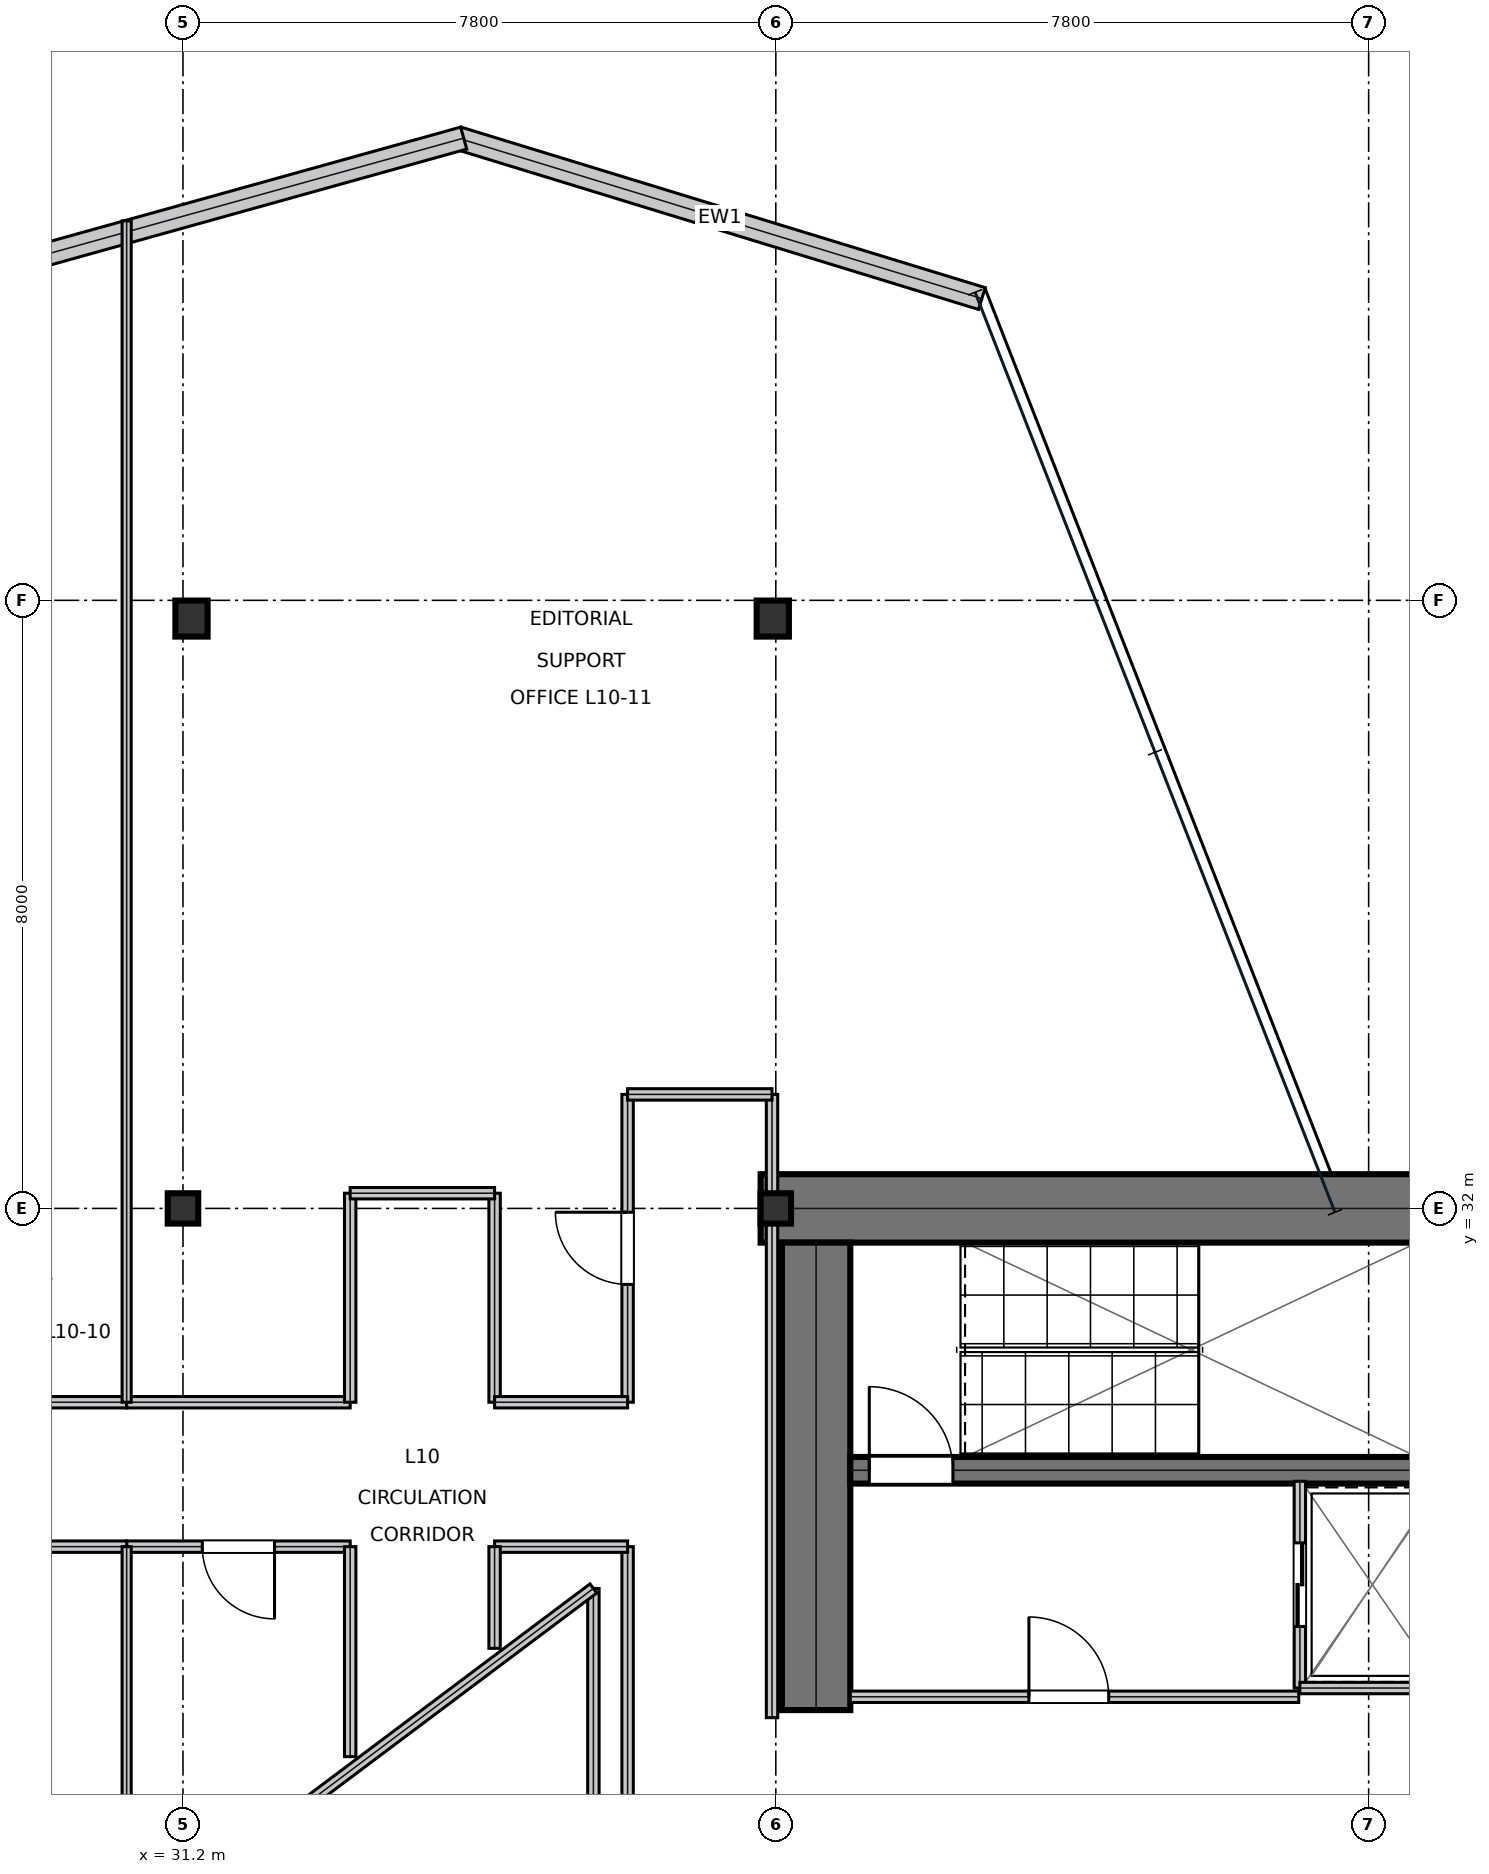
"""IFC4 building model, lengths in metres.
Left out: names, types, materials, properties, quantities, classifications, styles, units other than length and angle.
Written with IfcOpenShell. Run it as: python <this file> out.ifc"""

import sys

from ifc_helpers import new_model, si_unit, direction, frame, frame_2d, origin, origin_2d, place, context, subcontext, project, spatial, rectangle, i_section, extrude, element, fill, save


model = new_model("IFC4")
c1 = context("Model", 3, precision=1e-05, world=origin(), true_north=direction((0.0, 1.0)))
c2 = subcontext(c1, "Body", "Model", "MODEL_VIEW")
j1 = project(units=[si_unit("LENGTHUNIT", "METRE"), si_unit("PLANEANGLEUNIT", "RADIAN")], contexts=[c1])
p1 = place(None, origin())
s1 = spatial("IfcSite", under=j1, at=p1, CompositionType="ELEMENT")
p2 = place(p1, origin())
s2 = spatial("IfcBuilding", under=s1, at=p2, CompositionType="ELEMENT")
p3 = place(p2, frame((0.0, 0.0, 49.95)))
s3 = spatial("IfcBuildingStorey", under=s2, at=p3, CompositionType="ELEMENT", Elevation=49.95)
p4 = place(p3, frame((38.8, 32.0, 0.0), z_axis=(0.0, 0.0, 1.0), x_axis=(1.0, 0.0, 0.0)))
e1 = element("IfcWall", 1, at=p4, inside=s3, PredefinedType="SHEAR", context=c2, shape_type="SweptSolid", body=[
    extrude(rectangle(XDim=16.0, YDim=0.9, at=frame_2d((8.0, 0.0))), origin(), (0.0, 0.0, 1.0), 3.81),
])
p5 = place(p3, frame((39.53, 25.4, 0.0), z_axis=(0.0, 0.0, 1.0), x_axis=(0.0, 1.0, 0.0)))
e2 = element("IfcWall", 2, at=p5, inside=s3, PredefinedType="SHEAR", context=c2, shape_type="SweptSolid", body=[
    extrude(rectangle(XDim=6.15, YDim=0.9, at=frame_2d((3.075, 0.0))), origin(), (0.0, 0.0, 1.0), 3.81),
])
p6 = place(p3, frame((39.98, 28.555, 0.0), z_axis=(0.0, 0.0, 1.0), x_axis=(1.0, 0.0, 0.0)))
e3 = element("IfcWall", 3, at=p6, inside=s3, PredefinedType="SHEAR", context=c2, shape_type="SweptSolid", body=[
    extrude(rectangle(XDim=7.71, YDim=0.35, at=frame_2d((3.855, 0.0))), origin(), (0.0, 0.0, 1.0), 3.81),
])
p7 = place(p6, frame((0.25, 0.0, 0.0)))
e4 = element("IfcOpeningElement", 4, at=p7, cuts=e3, PredefinedType="OPENING", context=c2, shape_type="SweptSolid", body=[
    extrude(rectangle(XDim=1.1, YDim=2.15, at=frame_2d((0.55, 1.075))), frame((0.0, 0.185, 0.0), z_axis=(0.0, -1.0, 0.0), x_axis=(1.0, 0.0, 0.0)), (0.0, 0.0, 1.0), 0.37),
])
for number, where, z_axis, x_axis in (
    (5, (31.2, 32.0, 0.0), (0.0, 0.0, 1.0), (1.0, 0.0, 0.0)),
    (6, (39.0, 32.0, 0.0), (0.0, 0.0, 1.0), (1.0, 0.0, 0.0)),
):
    element("IfcColumn", number, at=place(p3, frame(where, z_axis=z_axis, x_axis=x_axis)), inside=s3, PredefinedType="COLUMN", context=c2, shape_type="SweptSolid", body=[
        extrude(i_section(OverallWidth=0.401, OverallDepth=0.399, WebThickness=0.025, FlangeThickness=0.04, at=origin_2d()), origin(), (0.0, 0.0, 1.0), 4.044),
    ])
for number, where, z_axis, x_axis in (
    (7, (31.312, 39.76, 0.016), (0.0, 0.0, 1.0), (1.0, 0.0, 0.0)),
    (8, (38.96, 39.76, 0.016), (0.0, 0.0, 1.0), (1.0, 0.0, 0.0)),
):
    element("IfcColumn", number, at=place(p3, frame(where, z_axis=z_axis, x_axis=x_axis)), inside=s3, PredefinedType="COLUMN", context=c2, shape_type="SweptSolid", body=[
        extrude(i_section(OverallWidth=0.424, OverallDepth=0.474, WebThickness=0.048, FlangeThickness=0.077, at=origin_2d()), origin(), (0.0, 0.0, 1.0), 4.018),
    ])
p8 = place(p3, frame((41.711, 43.97, 0.0), z_axis=(0.0, 0.0, 1.0), x_axis=(-0.956174816369, 0.292796380685, 0.0)))
e9 = element("IfcWall", 9, at=p8, inside=s3, PredefinedType="STANDARD", context=c2, shape_type="SweptSolid", body=[
    extrude(rectangle(XDim=7.213, YDim=0.3, at=frame_2d((3.606, 0.0))), origin(), (0.0, 0.0, 1.0), 3.81),
])
p9 = place(p3, frame((34.894, 46.081, 0.0), z_axis=(0.0, 0.0, 1.0), x_axis=(-0.963365312104, -0.268192608836, 0.0)))
e10 = element("IfcWall", 10, at=p9, inside=s3, PredefinedType="STANDARD", context=c2, shape_type="SweptSolid", body=[
    extrude(rectangle(XDim=7.159, YDim=0.3, at=frame_2d((3.579, 0.0))), origin(), (0.0, 0.0, 1.0), 3.81),
])
p10 = place(p3, frame((39.98, 25.575, 0.0), z_axis=(0.0, 0.0, 1.0), x_axis=(1.0, 0.0, 0.0)))
e11 = element("IfcWall", 11, at=p10, inside=s3, PredefinedType="PARTITIONING", context=c2, shape_type="SweptSolid", body=[
    extrude(rectangle(XDim=5.9, YDim=0.15, at=frame_2d((2.95, 0.0))), origin(), (0.0, 0.0, 1.0), 3.81),
])
p11 = place(p10, frame((2.35, 0.0, 0.0)))
e12 = element("IfcOpeningElement", 12, at=p11, cuts=e11, PredefinedType="OPENING", context=c2, shape_type="SweptSolid", body=[
    extrude(rectangle(XDim=1.05, YDim=2.15, at=frame_2d((0.525, 1.075))), frame((0.0, 0.085, 0.0), z_axis=(0.0, -1.0, 0.0), x_axis=(1.0, 0.0, 0.0)), (0.0, 0.0, 1.0), 0.17),
])
p12 = place(p3, frame((45.895, 25.69, 0.0), z_axis=(0.0, 0.0, 1.0), x_axis=(0.0, 1.0, 0.0)))
e13 = element("IfcWall", 13, at=p12, inside=s3, PredefinedType="PARTITIONING", context=c2, shape_type="SweptSolid", body=[
    extrude(rectangle(XDim=2.72, YDim=0.15, at=frame_2d((1.36, 0.0))), origin(), (0.0, 0.0, 1.0), 3.81),
])
p13 = place(p12, frame((0.81, 0.0, 0.0)))
e14 = element("IfcOpeningElement", 14, at=p13, cuts=e13, PredefinedType="OPENING", context=c2, shape_type="SweptSolid", body=[
    extrude(rectangle(XDim=1.1, YDim=2.15, at=frame_2d((0.55, 1.075))), frame((0.0, 0.085, 0.0), z_axis=(0.0, -1.0, 0.0), x_axis=(1.0, 0.0, 0.0)), (0.0, 0.0, 1.0), 0.17),
])
p14 = place(p3, frame((45.895, 25.69, 0.0), z_axis=(0.0, 0.0, 1.0), x_axis=(1.0, 0.0, 0.0)))
e15 = element("IfcWall", 15, at=p14, inside=s3, PredefinedType="PARTITIONING", context=c2, shape_type="SweptSolid", body=[
    extrude(rectangle(XDim=1.915, YDim=0.15, at=frame_2d((0.958, 0.0))), origin(), (0.0, 0.0, 1.0), 3.81),
])
p15 = place(p3, frame((37.05, 14.5, 0.0), z_axis=(0.0, 0.0, 1.0), x_axis=(0.0, 1.0, 0.0)))
e16 = element("IfcWall", 16, at=p15, inside=s3, PredefinedType="PARTITIONING", context=c2, shape_type="SweptSolid", body=[
    extrude(rectangle(XDim=13.05, YDim=0.15, at=frame_2d((6.525, 0.0))), origin(), (0.0, 0.0, 1.0), 3.181),
])
p16 = place(p15, frame((4.61, 0.0, 0.0)))
e17 = element("IfcOpeningElement", 17, at=p16, cuts=e16, PredefinedType="OPENING", context=c2, shape_type="SweptSolid", body=[
    extrude(rectangle(XDim=0.95, YDim=2.15, at=frame_2d((0.475, 1.075))), frame((0.0, 0.085, 0.0), z_axis=(0.0, -1.0, 0.0), x_axis=(1.0, 0.0, 0.0)), (0.0, 0.0, 1.0), 0.17),
])
p17 = place(p3, frame((30.459, 27.55, 0.0), z_axis=(0.0, 0.0, 1.0), x_axis=(1.0, 0.0, 0.0)))
e18 = element("IfcWall", 18, at=p17, inside=s3, PredefinedType="PARTITIONING", context=c2, shape_type="SweptSolid", body=[
    extrude(rectangle(XDim=2.941, YDim=0.15, at=frame_2d((1.47, 0.0))), origin(), (0.0, 0.0, 1.0), 3.181),
])
p18 = place(p17, frame((0.996, 0.0, 0.0)))
e19 = element("IfcOpeningElement", 19, at=p18, cuts=e18, PredefinedType="OPENING", context=c2, shape_type="SweptSolid", body=[
    extrude(rectangle(XDim=0.95, YDim=2.15, at=frame_2d((0.475, 1.075))), frame((0.0, 0.085, 0.0), z_axis=(0.0, -1.0, 0.0), x_axis=(1.0, 0.0, 0.0)), (0.0, 0.0, 1.0), 0.17),
])
p19 = place(p3, frame((21.4, 27.55, 0.0), z_axis=(0.0, 0.0, 1.0), x_axis=(1.0, 0.0, 0.0)))
e20 = element("IfcWall", 20, at=p19, inside=s3, PredefinedType="PARTITIONING", context=c2, shape_type="SweptSolid", body=[
    extrude(rectangle(XDim=9.059, YDim=0.15, at=frame_2d((4.53, 0.0))), origin(), (0.0, 0.0, 1.0), 3.391),
])
p20 = place(p19, frame((4.054, 0.0, 0.0)))
e21 = element("IfcOpeningElement", 21, at=p20, cuts=e20, PredefinedType="OPENING", context=c2, shape_type="SweptSolid", body=[
    extrude(rectangle(XDim=0.95, YDim=2.15, at=frame_2d((0.475, 1.075))), frame((0.0, 0.085, 0.0), z_axis=(0.0, -1.0, 0.0), x_axis=(1.0, 0.0, 0.0)), (0.0, 0.0, 1.0), 0.17),
])
p21 = place(p3, frame((15.794, 29.45, 0.0), z_axis=(0.0, 0.0, 1.0), x_axis=(1.0, 0.0, 0.0)))
e22 = element("IfcWall", 22, at=p21, inside=s3, PredefinedType="PARTITIONING", context=c2, shape_type="SweptSolid", body=[
    extrude(rectangle(XDim=14.665, YDim=0.15, at=frame_2d((7.333, 0.0))), origin(), (0.0, 0.0, 1.0), 3.338),
])
p22 = place(p21, frame((10.458, 0.0, 0.0)))
e23 = element("IfcOpeningElement", 23, at=p22, cuts=e22, PredefinedType="OPENING", context=c2, shape_type="SweptSolid", body=[
    extrude(rectangle(XDim=0.95, YDim=2.15, at=frame_2d((0.475, 1.075))), frame((0.0, 0.085, 0.0), z_axis=(0.0, -1.0, 0.0), x_axis=(1.0, 0.0, 0.0)), (0.0, 0.0, 1.0), 0.17),
])
p23 = place(p3, frame((37.05, 29.45, 0.0), z_axis=(0.0, 0.0, 1.0), x_axis=(0.0, 1.0, 0.0)))
e24 = element("IfcWall", 24, at=p23, inside=s3, PredefinedType="PARTITIONING", context=c2, shape_type="SweptSolid", body=[
    extrude(rectangle(XDim=4.05, YDim=0.15, at=frame_2d((2.025, 0.0))), origin(), (0.0, 0.0, 1.0), 3.181),
])
p24 = place(p23, frame((1.55, 0.0, 0.0)))
e25 = element("IfcOpeningElement", 25, at=p24, cuts=e24, PredefinedType="OPENING", context=c2, shape_type="SweptSolid", body=[
    extrude(rectangle(XDim=0.95, YDim=2.15, at=frame_2d((0.475, 1.075))), frame((0.0, 0.085, 0.0), z_axis=(0.0, -1.0, 0.0), x_axis=(1.0, 0.0, 0.0)), (0.0, 0.0, 1.0), 0.17),
])
p25 = place(p3, frame((35.3, 27.55, 0.0), z_axis=(0.0, 0.0, 1.0), x_axis=(1.0, 0.0, 0.0)))
e26 = element("IfcWall", 26, at=p25, inside=s3, PredefinedType="PARTITIONING", context=c2, shape_type="SweptSolid", body=[
    extrude(rectangle(XDim=1.75, YDim=0.15, at=frame_2d((0.875, 0.0))), origin(), (0.0, 0.0, 1.0), 3.391),
])
p26 = place(p3, frame((35.3, 26.212, 0.0), z_axis=(0.0, 0.0, 1.0), x_axis=(0.0, 1.0, 0.0)))
e27 = element("IfcWall", 27, at=p26, inside=s3, PredefinedType="PARTITIONING", context=c2, shape_type="SweptSolid", body=[
    extrude(rectangle(XDim=1.338, YDim=0.15, at=frame_2d((0.669, 0.0))), origin(), (0.0, 0.0, 1.0), 3.81),
])
p27 = place(p3, frame((33.4, 24.788, 0.0), z_axis=(0.0, 0.0, 1.0), x_axis=(0.0, 1.0, 0.0)))
e28 = element("IfcWall", 28, at=p27, inside=s3, PredefinedType="PARTITIONING", context=c2, shape_type="SweptSolid", body=[
    extrude(rectangle(XDim=2.762, YDim=0.15, at=frame_2d((1.381, 0.0))), origin(), (0.0, 0.0, 1.0), 3.81),
])
p28 = place(p3, frame((38.95, 25.3, 0.0), z_axis=(0.0, 0.0, 1.0), x_axis=(0.0, 1.0, 0.0)))
e29 = element("IfcWall", 29, at=p28, inside=s3, PredefinedType="PARTITIONING", context=c2, shape_type="SweptSolid", body=[
    extrude(rectangle(XDim=8.2, YDim=0.15, at=frame_2d((4.1, 0.0))), origin(), (0.0, 0.0, 1.0), 3.181),
])
p29 = place(p3, frame((30.459, 29.45, 0.0), z_axis=(0.0, 0.0, 1.0), x_axis=(1.0, 0.0, 0.0)))
e30 = element("IfcWall", 30, at=p29, inside=s3, PredefinedType="PARTITIONING", context=c2, shape_type="SweptSolid", body=[
    extrude(rectangle(XDim=2.941, YDim=0.15, at=frame_2d((1.47, 0.0))), origin(), (0.0, 0.0, 1.0), 3.181),
])
for number, where, z_axis, x_axis in (
    (31, (33.4, 29.45, 0.0), (0.0, 0.0, 1.0), (0.0, 1.0, 0.0)),
    (32, (35.3, 29.45, 0.0), (0.0, 0.0, 1.0), (0.0, 1.0, 0.0)),
):
    element("IfcWall", number, at=place(p3, frame(where, z_axis=z_axis, x_axis=x_axis)), inside=s3, PredefinedType="PARTITIONING", context=c2, shape_type="SweptSolid", body=[
        extrude(rectangle(XDim=2.75, YDim=0.15, at=frame_2d((1.375, 0.0))), origin(), (0.0, 0.0, 1.0), 3.181),
    ])
p30 = place(p3, frame((37.05, 33.5, 0.0), z_axis=(0.0, 0.0, 1.0), x_axis=(1.0, 0.0, 0.0)))
e33 = element("IfcWall", 33, at=p30, inside=s3, PredefinedType="PARTITIONING", context=c2, shape_type="SweptSolid", body=[
    extrude(rectangle(XDim=1.9, YDim=0.15, at=frame_2d((0.95, 0.0))), origin(), (0.0, 0.0, 1.0), 3.81),
])
p31 = place(p3, frame((33.4, 32.2, 0.0), z_axis=(0.0, 0.0, 1.0), x_axis=(1.0, 0.0, 0.0)))
e34 = element("IfcWall", 34, at=p31, inside=s3, PredefinedType="PARTITIONING", context=c2, shape_type="SweptSolid", body=[
    extrude(rectangle(XDim=1.9, YDim=0.15, at=frame_2d((0.95, 0.0))), origin(), (0.0, 0.0, 1.0), 3.181),
])
p32 = place(p3, frame((35.3, 29.45, 0.0), z_axis=(0.0, 0.0, 1.0), x_axis=(1.0, 0.0, 0.0)))
e35 = element("IfcWall", 35, at=p32, inside=s3, PredefinedType="PARTITIONING", context=c2, shape_type="SweptSolid", body=[
    extrude(rectangle(XDim=1.75, YDim=0.15, at=frame_2d((0.875, 0.0))), origin(), (0.0, 0.0, 1.0), 3.81),
])
p33 = place(p3, frame((30.459, 23.111, 0.0), z_axis=(0.0, 0.0, 1.0), x_axis=(0.0, 1.0, 0.0)))
e36 = element("IfcWall", 36, at=p33, inside=s3, PredefinedType="PARTITIONING", context=c2, shape_type="SweptSolid", body=[
    extrude(rectangle(XDim=4.439, YDim=0.12, at=frame_2d((2.219, 0.0))), origin(), (0.0, 0.0, 1.0), 3.181),
])
p34 = place(p3, frame((30.459, 29.45, 0.0), z_axis=(0.0, 0.0, 1.0), x_axis=(0.0, 1.0, 0.0)))
e37 = element("IfcWall", 37, at=p34, inside=s3, PredefinedType="PARTITIONING", context=c2, shape_type="SweptSolid", body=[
    extrude(rectangle(XDim=15.542, YDim=0.12, at=frame_2d((7.771, 0.0))), origin(), (0.0, 0.0, 1.0), 3.338),
])
p35 = place(p3, frame((36.6, 21.0, 0.0), z_axis=(0.0, 0.0, 1.0), x_axis=(0.0, 1.0, 0.0)))
e38 = element("IfcWall", 38, at=p35, inside=s3, PredefinedType="MOVABLE", context=c2, shape_type="SweptSolid", body=[
    extrude(rectangle(XDim=6.0, YDim=0.15, at=frame_2d((3.0, 0.0))), origin(), (0.0, 0.0, 1.0), 3.81),
])
p36 = place(p3, frame((36.6, 27.0, 0.0), z_axis=(0.0, 0.0, 1.0), x_axis=(-0.8, -0.6, 0.0)))
e39 = element("IfcWall", 39, at=p36, inside=s3, PredefinedType="MOVABLE", context=c2, shape_type="SweptSolid", body=[
    extrude(rectangle(XDim=5.0, YDim=0.15, at=frame_2d((2.5, 0.0))), origin(), (0.0, 0.0, 1.0), 3.81),
])
p37 = place(p11, origin())
e40 = element("IfcDoor", 40, at=p37, inside=s3, OperationType="SINGLE_SWING_LEFT", PredefinedType="DOOR", context=c2, shape_type="SweptSolid", body=[
    extrude(rectangle(XDim=1.05, YDim=2.15, at=frame_2d((0.525, 1.075))), frame((0.0, 0.025, 0.0), z_axis=(0.0, -1.0, 0.0), x_axis=(1.0, 0.0, 0.0)), (0.0, 0.0, 1.0), 0.05),
])
fill(e12, e40)
p38 = place(p13, frame((1.1, 0.0, 0.0), z_axis=(0.0, 0.0, 1.0), x_axis=(-1.0, 0.0, 0.0)))
e41 = element("IfcDoor", 41, at=p38, inside=s3, OperationType="DOUBLE_DOOR_SLIDING", PredefinedType="DOOR", context=c2, shape_type="SweptSolid", body=[
    extrude(rectangle(XDim=1.1, YDim=2.15, at=frame_2d((0.55, 1.075))), frame((0.0, 0.025, 0.0), z_axis=(0.0, -1.0, 0.0), x_axis=(1.0, 0.0, 0.0)), (0.0, 0.0, 1.0), 0.05),
])
fill(e14, e41)
p39 = place(p18, frame((0.95, 0.0, 0.0), z_axis=(0.0, 0.0, 1.0), x_axis=(-1.0, 0.0, 0.0)))
e42 = element("IfcDoor", 42, at=p39, inside=s3, OperationType="SINGLE_SWING_LEFT", PredefinedType="DOOR", context=c2, shape_type="SweptSolid", body=[
    extrude(rectangle(XDim=0.95, YDim=2.15, at=frame_2d((0.475, 1.075))), frame((0.0, 0.025, 0.0), z_axis=(0.0, -1.0, 0.0), x_axis=(1.0, 0.0, 0.0)), (0.0, 0.0, 1.0), 0.05),
])
fill(e19, e42)
p40 = place(p24, origin())
e43 = element("IfcDoor", 43, at=p40, inside=s3, OperationType="SINGLE_SWING_RIGHT", PredefinedType="DOOR", context=c2, shape_type="SweptSolid", body=[
    extrude(rectangle(XDim=0.95, YDim=2.15, at=frame_2d((0.475, 1.075))), frame((0.0, 0.025, 0.0), z_axis=(0.0, -1.0, 0.0), x_axis=(1.0, 0.0, 0.0)), (0.0, 0.0, 1.0), 0.05),
])
fill(e25, e43)
p41 = place(p7, origin())
e44 = element("IfcDoor", 44, at=p41, inside=s3, OperationType="SINGLE_SWING_LEFT", PredefinedType="DOOR", context=c2, shape_type="SweptSolid", body=[
    extrude(rectangle(XDim=1.1, YDim=2.15, at=frame_2d((0.55, 1.075))), frame((0.0, 0.025, 0.0), z_axis=(0.0, -1.0, 0.0), x_axis=(1.0, 0.0, 0.0)), (0.0, 0.0, 1.0), 0.05),
])
fill(e4, e44)
save(model, sys.argv[1])
